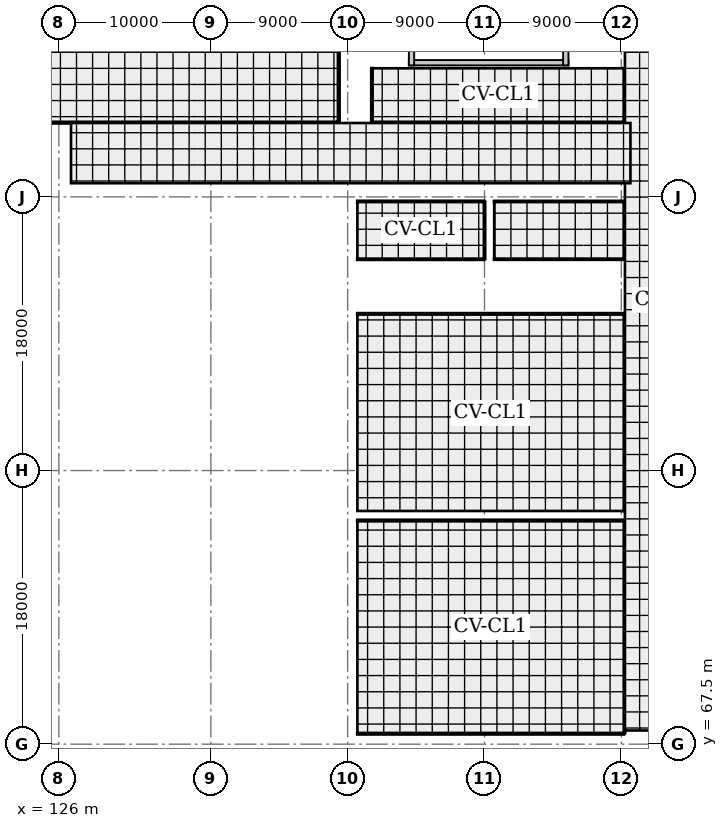
"""IFC4 building model, lengths in metres.
Left out: names, types, materials, properties, quantities, classifications, styles, units other than length and angle.
Written with IfcOpenShell. Run it as: python <this file> out.ifc"""

import sys

from ifc_helpers import new_model, si_unit, direction, frame, frame_2d, origin, origin_2d, place, context, subcontext, project, spatial, rectangle, i_section, extrude, element, fill, save


model = new_model("IFC4")
c1 = context("Model", 3, precision=1e-05, world=origin(), true_north=direction((0.0, 1.0)))
c2 = subcontext(c1, "Body", "Model", "MODEL_VIEW")
j1 = project(units=[si_unit("LENGTHUNIT", "METRE"), si_unit("PLANEANGLEUNIT", "RADIAN")], contexts=[c1])
p1 = place(None, origin())
s1 = spatial("IfcSite", under=j1, at=p1, CompositionType="ELEMENT")
p2 = place(p1, origin())
s2 = spatial("IfcBuilding", under=s1, at=p2, CompositionType="ELEMENT")
p3 = place(p2, frame((0.0, 0.0, 14.4)))
s3 = spatial("IfcBuildingStorey", under=s2, at=p3, CompositionType="ELEMENT", Elevation=14.4)
p4 = place(p3, frame((126.0, 103.5, 0.0), z_axis=(0.0, 0.0, 1.0), x_axis=(1.0, 0.0, 0.0)))
e1 = element("IfcColumn", 1, at=p4, inside=s3, PredefinedType="COLUMN", context=c2, shape_type="SweptSolid", body=[
    extrude(rectangle(XDim=0.9, YDim=0.9, at=origin_2d()), origin(), (0.0, 0.0, 1.0), 3.2),
])
for number, where, z_axis, x_axis in (
    (2, (136.0, 103.5, 0.0), (0.0, 0.0, 1.0), (1.0, 0.0, 0.0)),
    (3, (145.0, 67.5, 0.0), (0.0, 0.0, 1.0), (1.0, 0.0, 0.0)),
    (4, (145.0, 76.5, 0.0), (0.0, 0.0, 1.0), (1.0, 0.0, 0.0)),
    (5, (145.0, 85.5, 0.0), (0.0, 0.0, 1.0), (1.0, 0.0, 0.0)),
    (6, (145.0, 94.5, 0.0), (0.0, 0.0, 1.0), (1.0, 0.0, 0.0)),
    (7, (145.0, 103.5, 0.0), (0.0, 0.0, 1.0), (1.0, 0.0, 0.0)),
    (8, (154.0, 67.5, 0.0), (0.0, 0.0, 1.0), (1.0, 0.0, 0.0)),
    (9, (154.0, 76.5, 0.0), (0.0, 0.0, 1.0), (1.0, 0.0, 0.0)),
    (10, (154.0, 85.5, 0.0), (0.0, 0.0, 1.0), (1.0, 0.0, 0.0)),
    (11, (154.0, 94.5, 0.0), (0.0, 0.0, 1.0), (1.0, 0.0, 0.0)),
    (12, (154.0, 103.5, 0.0), (0.0, 0.0, 1.0), (1.0, 0.0, 0.0)),
    (13, (163.0, 67.5, 0.0), (0.0, 0.0, 1.0), (1.0, 0.0, 0.0)),
    (14, (163.0, 76.5, 0.0), (0.0, 0.0, 1.0), (1.0, 0.0, 0.0)),
    (15, (163.0, 85.5, 0.0), (0.0, 0.0, 1.0), (1.0, 0.0, 0.0)),
    (16, (163.0, 94.5, 0.0), (0.0, 0.0, 1.0), (1.0, 0.0, 0.0)),
    (17, (163.0, 103.5, 0.0), (0.0, 0.0, 1.0), (1.0, 0.0, 0.0)),
):
    element("IfcColumn", number, at=place(p3, frame(where, z_axis=z_axis, x_axis=x_axis)), inside=s3, PredefinedType="COLUMN", context=c2, shape_type="SweptSolid", body=[
        extrude(i_section(OverallWidth=0.4, OverallDepth=0.4, WebThickness=0.013, FlangeThickness=0.021, FilletRadius=0.022, at=origin_2d()), origin(), (0.0, 0.0, 1.0), 3.2),
    ])
p5 = place(p3, frame((149.025, 112.325, 0.0), z_axis=(0.0, 0.0, 1.0), x_axis=(1.0, 0.0, 0.0)))
e18 = element("IfcWall", 18, at=p5, inside=s3, PredefinedType="SHEAR", context=c2, shape_type="SweptSolid", body=[
    extrude(rectangle(XDim=10.498, YDim=0.35, at=frame_2d((5.249, 0.0))), origin(), (0.0, 0.0, 1.0), 3.0),
])
p6 = place(p5, frame((0.55, 0.0, 0.0)))
e19 = element("IfcOpeningElement", 19, at=p6, cuts=e18, PredefinedType="OPENING", context=c2, shape_type="SweptSolid", body=[
    extrude(rectangle(XDim=1.3, YDim=2.1, at=frame_2d((0.65, 1.05))), frame((0.0, 0.185, 0.0), z_axis=(0.0, -1.0, 0.0), x_axis=(1.0, 0.0, 0.0)), (0.0, 0.0, 1.0), 0.37),
])
for number, where, z_axis, x_axis in (
    (20, (159.347, 112.15, 0.0), (0.0, 0.0, 1.0), (0.0, 1.0, 0.0)),
    (21, (149.2, 116.47, 0.0), (0.0, 0.0, 1.0), (0.0, -1.0, 0.0)),
):
    element("IfcWall", number, at=place(p3, frame(where, z_axis=z_axis, x_axis=x_axis)), inside=s3, PredefinedType="SHEAR", context=c2, shape_type="SweptSolid", body=[
        extrude(rectangle(XDim=4.32, YDim=0.35, at=frame_2d((2.16, 0.0))), origin(), (0.0, 0.0, 1.0), 3.0),
    ])
p7 = place(p3, frame((144.4, 108.4, 0.0), z_axis=(0.0, 0.0, 1.0), x_axis=(-1.0, 0.0, 0.0)))
e22 = element("IfcWall", 22, at=p7, inside=s3, PredefinedType="PARTITIONING", context=c2, shape_type="SweptSolid", body=[
    extrude(rectangle(XDim=26.8, YDim=0.19, at=frame_2d((13.4, 0.0))), origin(), (0.0, 0.0, 1.0), 2.375),
])
p8 = place(p7, frame((12.625, 0.0, 0.0)))
e23 = element("IfcOpeningElement", 23, at=p8, cuts=e22, PredefinedType="OPENING", context=c2, shape_type="SweptSolid", body=[
    extrude(rectangle(XDim=1.55, YDim=2.1, at=frame_2d((0.775, 1.05))), frame((0.0, 0.105, 0.0), z_axis=(0.0, -1.0, 0.0), x_axis=(1.0, 0.0, 0.0)), (0.0, 0.0, 1.0), 0.21),
])
p9 = place(p3, frame((144.4, 125.4, 0.0), z_axis=(0.0, 0.0, 1.0), x_axis=(0.0, -1.0, 0.0)))
e24 = element("IfcWall", 24, at=p9, inside=s3, PredefinedType="PARTITIONING", context=c2, shape_type="SweptSolid", body=[
    extrude(rectangle(XDim=17.0, YDim=0.19, at=frame_2d((8.5, 0.0))), origin(), (0.0, 0.0, 1.0), 2.375),
])
p10 = place(p3, frame((163.2, 68.2, 0.0), z_axis=(0.0, 0.0, 1.0), x_axis=(-1.0, 0.0, 0.0)))
e25 = element("IfcWall", 25, at=p10, inside=s3, PredefinedType="PARTITIONING", context=c2, shape_type="SweptSolid", body=[
    extrude(rectangle(XDim=17.6, YDim=0.175, at=frame_2d((8.8, 0.0))), origin(), (0.0, 0.0, 1.0), 2.505),
])
p11 = place(p3, frame((145.6, 82.2, 0.0), z_axis=(0.0, 0.0, 1.0), x_axis=(1.0, 0.0, 0.0)))
e26 = element("IfcWall", 26, at=p11, inside=s3, PredefinedType="PARTITIONING", context=c2, shape_type="SweptSolid", body=[
    extrude(rectangle(XDim=17.6, YDim=0.175, at=frame_2d((8.8, 0.0))), origin(), (0.0, 0.0, 1.0), 2.555),
])
p12 = place(p3, frame((163.2, 82.2, 0.0), z_axis=(0.0, 0.0, 1.0), x_axis=(0.0, -1.0, 0.0)))
e27 = element("IfcWall", 27, at=p12, inside=s3, PredefinedType="PARTITIONING", context=c2, shape_type="SweptSolid", body=[
    extrude(rectangle(XDim=14.0, YDim=0.175, at=frame_2d((7.0, 0.0))), origin(), (0.0, 0.0, 1.0), 2.505),
])
p13 = place(p12, frame((6.375, 0.0, 0.0)))
e28 = element("IfcOpeningElement", 28, at=p13, cuts=e27, PredefinedType="OPENING", context=c2, shape_type="SweptSolid", body=[
    extrude(rectangle(XDim=1.25, YDim=2.1, at=frame_2d((0.625, 1.05))), frame((0.0, 0.097, 0.0), z_axis=(0.0, -1.0, 0.0), x_axis=(1.0, 0.0, 0.0)), (0.0, 0.0, 1.0), 0.195),
])
p14 = place(p3, frame((145.6, 95.8, 0.0), z_axis=(0.0, 0.0, 1.0), x_axis=(1.0, 0.0, 0.0)))
e29 = element("IfcWall", 29, at=p14, inside=s3, PredefinedType="PARTITIONING", context=c2, shape_type="SweptSolid", body=[
    extrude(rectangle(XDim=17.6, YDim=0.16, at=frame_2d((8.8, 0.0))), origin(), (0.0, 0.0, 1.0), 2.555),
])
p15 = place(p3, frame((163.2, 95.8, 0.0), z_axis=(0.0, 0.0, 1.0), x_axis=(0.0, -1.0, 0.0)))
e30 = element("IfcWall", 30, at=p15, inside=s3, PredefinedType="PARTITIONING", context=c2, shape_type="SweptSolid", body=[
    extrude(rectangle(XDim=13.0, YDim=0.16, at=frame_2d((6.5, 0.0))), origin(), (0.0, 0.0, 1.0), 2.535),
])
p16 = place(p15, frame((5.825, 0.0, 0.0)))
e31 = element("IfcOpeningElement", 31, at=p16, cuts=e30, PredefinedType="OPENING", context=c2, shape_type="SweptSolid", body=[
    extrude(rectangle(XDim=1.35, YDim=2.1, at=frame_2d((0.675, 1.05))), frame((0.0, 0.09, 0.0), z_axis=(0.0, -1.0, 0.0), x_axis=(1.0, 0.0, 0.0)), (0.0, 0.0, 1.0), 0.18),
])
p17 = place(p15, frame((8.28, 0.0, 0.0)))
e32 = element("IfcOpeningElement", 32, at=p17, cuts=e30, PredefinedType="OPENING", context=c2, shape_type="SweptSolid", body=[
    extrude(rectangle(XDim=1.35, YDim=2.1, at=frame_2d((0.675, 1.05))), frame((0.0, 0.09, 0.0), z_axis=(0.0, -1.0, 0.0), x_axis=(1.0, 0.0, 0.0)), (0.0, 0.0, 1.0), 0.18),
])
p18 = place(p3, frame((163.2, 108.4, 0.0), z_axis=(0.0, 0.0, 1.0), x_axis=(-1.0, 0.0, 0.0)))
e33 = element("IfcWall", 33, at=p18, inside=s3, PredefinedType="PARTITIONING", context=c2, shape_type="SweptSolid", body=[
    extrude(rectangle(XDim=16.6, YDim=0.15, at=frame_2d((8.3, 0.0))), origin(), (0.0, 0.0, 1.0), 2.375),
])
p19 = place(p18, frame((7.675, 0.0, 0.0)))
e34 = element("IfcOpeningElement", 34, at=p19, cuts=e33, PredefinedType="OPENING", context=c2, shape_type="SweptSolid", body=[
    extrude(rectangle(XDim=1.25, YDim=2.1, at=frame_2d((0.625, 1.05))), frame((0.0, 0.085, 0.0), z_axis=(0.0, -1.0, 0.0), x_axis=(1.0, 0.0, 0.0)), (0.0, 0.0, 1.0), 0.17),
])
p20 = place(p18, frame((12.616, 0.0, 0.0)))
e35 = element("IfcOpeningElement", 35, at=p20, cuts=e33, PredefinedType="OPENING", context=c2, shape_type="SweptSolid", body=[
    extrude(rectangle(XDim=1.25, YDim=2.1, at=frame_2d((0.625, 1.05))), frame((0.0, 0.085, 0.0), z_axis=(0.0, -1.0, 0.0), x_axis=(1.0, 0.0, 0.0)), (0.0, 0.0, 1.0), 0.17),
])
p21 = place(p3, frame((146.6, 108.4, 0.0), z_axis=(0.0, 0.0, 1.0), x_axis=(0.0, 1.0, 0.0)))
e36 = element("IfcWall", 36, at=p21, inside=s3, PredefinedType="PARTITIONING", context=c2, shape_type="SweptSolid", body=[
    extrude(rectangle(XDim=3.6, YDim=0.15, at=frame_2d((1.8, 0.0))), origin(), (0.0, 0.0, 1.0), 2.975),
])
p22 = place(p3, frame((163.2, 112.0, 0.0), z_axis=(0.0, 0.0, 1.0), x_axis=(0.0, -1.0, 0.0)))
e37 = element("IfcWall", 37, at=p22, inside=s3, PredefinedType="PARTITIONING", context=c2, shape_type="SweptSolid", body=[
    extrude(rectangle(XDim=3.6, YDim=0.15, at=frame_2d((1.8, 0.0))), origin(), (0.0, 0.0, 1.0), 2.375),
])
p23 = place(p3, frame((154.0, 99.4, 0.0), z_axis=(0.0, 0.0, 1.0), x_axis=(-1.0, 0.0, 0.0)))
e38 = element("IfcWall", 38, at=p23, inside=s3, PredefinedType="PARTITIONING", context=c2, shape_type="SweptSolid", body=[
    extrude(rectangle(XDim=8.4, YDim=0.14, at=frame_2d((4.2, 0.0))), origin(), (0.0, 0.0, 1.0), 2.555),
])
p24 = place(p23, frame((3.75, 0.0, 0.0)))
e39 = element("IfcOpeningElement", 39, at=p24, cuts=e38, PredefinedType="OPENING", context=c2, shape_type="SweptSolid", body=[
    extrude(rectangle(XDim=0.9, YDim=2.1, at=frame_2d((0.45, 1.05))), frame((0.0, 0.08, 0.0), z_axis=(0.0, -1.0, 0.0), x_axis=(1.0, 0.0, 0.0)), (0.0, 0.0, 1.0), 0.16),
])
p25 = place(p3, frame((145.6, 103.2, 0.0), z_axis=(0.0, 0.0, 1.0), x_axis=(1.0, 0.0, 0.0)))
e40 = element("IfcWall", 40, at=p25, inside=s3, PredefinedType="PARTITIONING", context=c2, shape_type="SweptSolid", body=[
    extrude(rectangle(XDim=8.4, YDim=0.14, at=frame_2d((4.2, 0.0))), origin(), (0.0, 0.0, 1.0), 2.375),
])
p26 = place(p3, frame((154.0, 103.2, 0.0), z_axis=(0.0, 0.0, 1.0), x_axis=(0.0, -1.0, 0.0)))
e41 = element("IfcWall", 41, at=p26, inside=s3, PredefinedType="PARTITIONING", context=c2, shape_type="SweptSolid", body=[
    extrude(rectangle(XDim=3.8, YDim=0.14, at=frame_2d((1.9, 0.0))), origin(), (0.0, 0.0, 1.0), 2.505),
])
p27 = place(p3, frame((163.2, 99.4, 0.0), z_axis=(0.0, 0.0, 1.0), x_axis=(-1.0, 0.0, 0.0)))
e42 = element("IfcWall", 42, at=p27, inside=s3, PredefinedType="PARTITIONING", context=c2, shape_type="SweptSolid", body=[
    extrude(rectangle(XDim=8.6, YDim=0.13, at=frame_2d((4.3, 0.0))), origin(), (0.0, 0.0, 1.0), 2.555),
])
p28 = place(p27, frame((3.85, 0.0, 0.0)))
e43 = element("IfcOpeningElement", 43, at=p28, cuts=e42, PredefinedType="OPENING", context=c2, shape_type="SweptSolid", body=[
    extrude(rectangle(XDim=0.9, YDim=2.1, at=frame_2d((0.45, 1.05))), frame((0.0, 0.075, 0.0), z_axis=(0.0, -1.0, 0.0), x_axis=(1.0, 0.0, 0.0)), (0.0, 0.0, 1.0), 0.15),
])
p29 = place(p3, frame((154.6, 103.2, 0.0), z_axis=(0.0, 0.0, 1.0), x_axis=(1.0, 0.0, 0.0)))
e44 = element("IfcWall", 44, at=p29, inside=s3, PredefinedType="PARTITIONING", context=c2, shape_type="SweptSolid", body=[
    extrude(rectangle(XDim=8.6, YDim=0.13, at=frame_2d((4.3, 0.0))), origin(), (0.0, 0.0, 1.0), 2.375),
])
p30 = place(p3, frame((163.2, 103.2, 0.0), z_axis=(0.0, 0.0, 1.0), x_axis=(0.0, -1.0, 0.0)))
e45 = element("IfcWall", 45, at=p30, inside=s3, PredefinedType="PARTITIONING", context=c2, shape_type="SweptSolid", body=[
    extrude(rectangle(XDim=3.8, YDim=0.13, at=frame_2d((1.9, 0.0))), origin(), (0.0, 0.0, 1.0), 2.375),
])
p31 = place(p6, origin())
e46 = element("IfcDoor", 46, at=p31, inside=s3, OperationType="SINGLE_SWING_LEFT", PredefinedType="DOOR", context=c2, shape_type="SweptSolid", body=[
    extrude(rectangle(XDim=1.3, YDim=2.1, at=frame_2d((0.65, 1.05))), frame((0.0, 0.025, 0.0), z_axis=(0.0, -1.0, 0.0), x_axis=(1.0, 0.0, 0.0)), (0.0, 0.0, 1.0), 0.05),
])
fill(e19, e46)
p32 = place(p8, origin())
e47 = element("IfcDoor", 47, at=p32, inside=s3, OperationType="SINGLE_SWING_RIGHT", PredefinedType="DOOR", context=c2, shape_type="SweptSolid", body=[
    extrude(rectangle(XDim=1.55, YDim=2.1, at=frame_2d((0.775, 1.05))), frame((0.0, 0.025, 0.0), z_axis=(0.0, -1.0, 0.0), x_axis=(1.0, 0.0, 0.0)), (0.0, 0.0, 1.0), 0.05),
])
fill(e23, e47)
p33 = place(p13, origin())
e48 = element("IfcDoor", 48, at=p33, inside=s3, OperationType="SINGLE_SWING_LEFT", PredefinedType="DOOR", context=c2, shape_type="SweptSolid", body=[
    extrude(rectangle(XDim=1.25, YDim=2.1, at=frame_2d((0.625, 1.05))), frame((0.0, 0.025, 0.0), z_axis=(0.0, -1.0, 0.0), x_axis=(1.0, 0.0, 0.0)), (0.0, 0.0, 1.0), 0.05),
])
fill(e28, e48)
p34 = place(p16, origin())
e49 = element("IfcDoor", 49, at=p34, inside=s3, OperationType="SINGLE_SWING_RIGHT", PredefinedType="DOOR", context=c2, shape_type="SweptSolid", body=[
    extrude(rectangle(XDim=1.35, YDim=2.1, at=frame_2d((0.675, 1.05))), frame((0.0, 0.025, 0.0), z_axis=(0.0, -1.0, 0.0), x_axis=(1.0, 0.0, 0.0)), (0.0, 0.0, 1.0), 0.05),
])
fill(e31, e49)
p35 = place(p17, origin())
e50 = element("IfcDoor", 50, at=p35, inside=s3, OperationType="SINGLE_SWING_LEFT", PredefinedType="DOOR", context=c2, shape_type="SweptSolid", body=[
    extrude(rectangle(XDim=1.35, YDim=2.1, at=frame_2d((0.675, 1.05))), frame((0.0, 0.025, 0.0), z_axis=(0.0, -1.0, 0.0), x_axis=(1.0, 0.0, 0.0)), (0.0, 0.0, 1.0), 0.05),
])
fill(e32, e50)
p36 = place(p19, origin())
e51 = element("IfcDoor", 51, at=p36, inside=s3, OperationType="SINGLE_SWING_RIGHT", PredefinedType="DOOR", context=c2, shape_type="SweptSolid", body=[
    extrude(rectangle(XDim=1.25, YDim=2.1, at=frame_2d((0.625, 1.05))), frame((0.0, 0.025, 0.0), z_axis=(0.0, -1.0, 0.0), x_axis=(1.0, 0.0, 0.0)), (0.0, 0.0, 1.0), 0.05),
])
fill(e34, e51)
p37 = place(p20, origin())
e52 = element("IfcDoor", 52, at=p37, inside=s3, OperationType="SINGLE_SWING_LEFT", PredefinedType="DOOR", context=c2, shape_type="SweptSolid", body=[
    extrude(rectangle(XDim=1.25, YDim=2.1, at=frame_2d((0.625, 1.05))), frame((0.0, 0.025, 0.0), z_axis=(0.0, -1.0, 0.0), x_axis=(1.0, 0.0, 0.0)), (0.0, 0.0, 1.0), 0.05),
])
fill(e35, e52)
p38 = place(p24, origin())
e53 = element("IfcDoor", 53, at=p38, inside=s3, OperationType="SINGLE_SWING_RIGHT", PredefinedType="DOOR", context=c2, shape_type="SweptSolid", body=[
    extrude(rectangle(XDim=0.9, YDim=2.1, at=frame_2d((0.45, 1.05))), frame((0.0, 0.025, 0.0), z_axis=(0.0, -1.0, 0.0), x_axis=(1.0, 0.0, 0.0)), (0.0, 0.0, 1.0), 0.05),
])
fill(e39, e53)
p39 = place(p28, origin())
e54 = element("IfcDoor", 54, at=p39, inside=s3, OperationType="SINGLE_SWING_LEFT", PredefinedType="DOOR", context=c2, shape_type="SweptSolid", body=[
    extrude(rectangle(XDim=0.9, YDim=2.1, at=frame_2d((0.45, 1.05))), frame((0.0, 0.025, 0.0), z_axis=(0.0, -1.0, 0.0), x_axis=(1.0, 0.0, 0.0)), (0.0, 0.0, 1.0), 0.05),
])
fill(e43, e54)
save(model, sys.argv[1])
